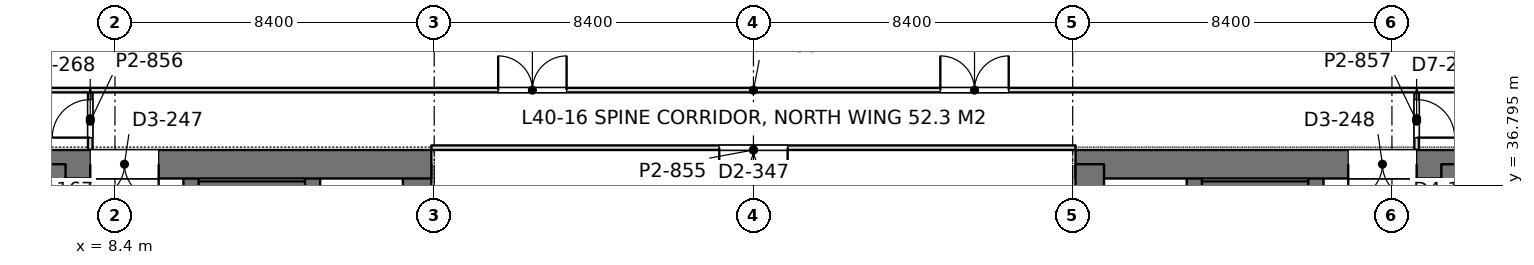
"""IFC4 building model, lengths in metres.
Left out: names, types, materials, properties, quantities, classifications, styles, units other than length and angle.
Written with IfcOpenShell. Run it as: python <this file> out.ifc"""

import sys

from ifc_helpers import new_model, si_unit, direction, frame, frame_2d, origin, place, context, subcontext, project, spatial, rectangle, extrude, element, fill, save


model = new_model("IFC4")
c1 = context("Model", 3, precision=1e-05, world=origin(), true_north=direction((0.0, 1.0)))
c2 = subcontext(c1, "Body", "Model", "MODEL_VIEW")
j1 = project(units=[si_unit("LENGTHUNIT", "METRE"), si_unit("PLANEANGLEUNIT", "RADIAN")], contexts=[c1])
p1 = place(None, origin())
s1 = spatial("IfcSite", under=j1, at=p1, CompositionType="ELEMENT")
p2 = place(p1, origin())
s2 = spatial("IfcBuilding", under=s1, at=p2, CompositionType="ELEMENT")
p3 = place(p2, frame((0.0, 0.0, 177.6)))
s3 = spatial("IfcBuildingStorey", under=s2, at=p3, CompositionType="ELEMENT", Elevation=177.6)
p4 = place(p3, frame((-1.125, 37.35, 0.0), z_axis=(0.0, 0.0, 1.0), x_axis=(1.0, 0.0, 0.0)))
e1 = element("IfcWall", 1, at=p4, inside=s3, PredefinedType="SHEAR", context=c2, shape_type="SweptSolid", body=[
    extrude(rectangle(XDim=17.85, YDim=0.75, at=frame_2d((8.925, 0.0))), origin(), (0.0, 0.0, 1.0), 4.2),
])
p5 = place(p4, frame((8.875, 0.0, 0.0)))
e2 = element("IfcOpeningElement", 2, at=p5, cuts=e1, PredefinedType="OPENING", context=c2, shape_type="SweptSolid", body=[
    extrude(rectangle(XDim=1.8, YDim=2.4, at=frame_2d((0.9, 1.2))), frame((0.0, 0.385, 0.0), z_axis=(0.0, -1.0, 0.0), x_axis=(1.0, 0.0, 0.0)), (0.0, 0.0, 1.0), 0.77),
])
p6 = place(p3, frame((16.35, 27.8, 0.0), z_axis=(0.0, 0.0, 1.0), x_axis=(0.0, 1.0, 0.0)))
e3 = element("IfcWall", 3, at=p6, inside=s3, PredefinedType="SHEAR", context=c2, shape_type="SweptSolid", body=[
    extrude(rectangle(XDim=9.55, YDim=0.75, at=frame_2d((4.775, 0.0))), origin(), (0.0, 0.0, 1.0), 4.2),
])
p7 = place(p3, frame((6.9, 13.05, 0.0), z_axis=(0.0, 0.0, 1.0), x_axis=(0.0, 1.0, 0.0)))
e4 = element("IfcWall", 4, at=p7, inside=s3, PredefinedType="SHEAR", context=c2, shape_type="SweptSolid", body=[
    extrude(rectangle(XDim=24.3, YDim=0.4, at=frame_2d((12.15, 0.0))), origin(), (0.0, 0.0, 1.0), 4.2),
])
p8 = place(p7, frame((1.3, 0.0, 0.0)))
e5 = element("IfcOpeningElement", 5, at=p8, cuts=e4, PredefinedType="OPENING", context=c2, shape_type="SweptSolid", body=[
    extrude(rectangle(XDim=1.0, YDim=2.2, at=frame_2d((0.5, 1.1))), frame((0.0, 0.21, 0.0), z_axis=(0.0, -1.0, 0.0), x_axis=(1.0, 0.0, 0.0)), (0.0, 0.0, 1.0), 0.42),
])
p9 = place(p7, frame((22.0, 0.0, 0.0)))
e6 = element("IfcOpeningElement", 6, at=p9, cuts=e4, PredefinedType="OPENING", context=c2, shape_type="SweptSolid", body=[
    extrude(rectangle(XDim=1.0, YDim=2.2, at=frame_2d((0.5, 1.1))), frame((0.0, 0.21, 0.0), z_axis=(0.0, -1.0, 0.0), x_axis=(1.0, 0.0, 0.0)), (0.0, 0.0, 1.0), 0.42),
])
p10 = place(p7, frame((5.55, 0.0, 0.0)))
e7 = element("IfcOpeningElement", 7, at=p10, cuts=e4, PredefinedType="OPENING", context=c2, shape_type="SweptSolid", body=[
    extrude(rectangle(XDim=1.0, YDim=2.2, at=frame_2d((0.5, 1.1))), frame((0.0, 0.21, 0.0), z_axis=(0.0, -1.0, 0.0), x_axis=(1.0, 0.0, 0.0)), (0.0, 0.0, 1.0), 0.42),
])
p11 = place(p7, frame((9.55, 0.0, 0.0)))
e8 = element("IfcOpeningElement", 8, at=p11, cuts=e4, PredefinedType="OPENING", context=c2, shape_type="SweptSolid", body=[
    extrude(rectangle(XDim=1.0, YDim=2.2, at=frame_2d((0.5, 1.1))), frame((0.0, 0.21, 0.0), z_axis=(0.0, -1.0, 0.0), x_axis=(1.0, 0.0, 0.0)), (0.0, 0.0, 1.0), 0.42),
])
p12 = place(p7, frame((12.8, 0.0, 0.0)))
e9 = element("IfcOpeningElement", 9, at=p12, cuts=e4, PredefinedType="OPENING", context=c2, shape_type="SweptSolid", body=[
    extrude(rectangle(XDim=1.1, YDim=2.2, at=frame_2d((0.55, 1.1))), frame((0.0, 0.21, 0.0), z_axis=(0.0, -1.0, 0.0), x_axis=(1.0, 0.0, 0.0)), (0.0, 0.0, 1.0), 0.42),
])
p13 = place(p7, frame((15.538, 0.0, 0.0)))
e10 = element("IfcOpeningElement", 10, at=p13, cuts=e4, PredefinedType="OPENING", context=c2, shape_type="SweptSolid", body=[
    extrude(rectangle(XDim=1.1, YDim=2.2, at=frame_2d((0.55, 1.1))), frame((0.0, 0.21, 0.0), z_axis=(0.0, -1.0, 0.0), x_axis=(1.0, 0.0, 0.0)), (0.0, 0.0, 1.0), 0.42),
])
p14 = place(p7, frame((18.262, 0.0, 0.0)))
e11 = element("IfcOpeningElement", 11, at=p14, cuts=e4, PredefinedType="OPENING", context=c2, shape_type="SweptSolid", body=[
    extrude(rectangle(XDim=1.1, YDim=2.2, at=frame_2d((0.55, 1.1))), frame((0.0, 0.21, 0.0), z_axis=(0.0, -1.0, 0.0), x_axis=(1.0, 0.0, 0.0)), (0.0, 0.0, 1.0), 0.42),
])
p15 = place(p3, frame((10.4, 13.05, 0.0), z_axis=(0.0, 0.0, 1.0), x_axis=(0.0, 1.0, 0.0)))
e12 = element("IfcWall", 12, at=p15, inside=s3, PredefinedType="SHEAR", context=c2, shape_type="SweptSolid", body=[
    extrude(rectangle(XDim=24.3, YDim=0.4, at=frame_2d((12.15, 0.0))), origin(), (0.0, 0.0, 1.0), 4.2),
])
p16 = place(p15, frame((15.75, 0.0, 0.0)))
e13 = element("IfcOpeningElement", 13, at=p16, cuts=e12, PredefinedType="OPENING", context=c2, shape_type="SweptSolid", body=[
    extrude(rectangle(XDim=1.1, YDim=2.2, at=frame_2d((0.55, 1.1))), frame((0.0, 0.21, 0.0), z_axis=(0.0, -1.0, 0.0), x_axis=(1.0, 0.0, 0.0)), (0.0, 0.0, 1.0), 0.42),
])
p17 = place(p15, frame((18.6, 0.0, 0.0)))
e14 = element("IfcOpeningElement", 14, at=p17, cuts=e12, PredefinedType="OPENING", context=c2, shape_type="SweptSolid", body=[
    extrude(rectangle(XDim=1.1, YDim=2.2, at=frame_2d((0.55, 1.1))), frame((0.0, 0.21, 0.0), z_axis=(0.0, -1.0, 0.0), x_axis=(1.0, 0.0, 0.0)), (0.0, 0.0, 1.0), 0.42),
])
p18 = place(p15, frame((21.45, 0.0, 0.0)))
e15 = element("IfcOpeningElement", 15, at=p18, cuts=e12, PredefinedType="OPENING", context=c2, shape_type="SweptSolid", body=[
    extrude(rectangle(XDim=1.1, YDim=2.2, at=frame_2d((0.55, 1.1))), frame((0.0, 0.21, 0.0), z_axis=(0.0, -1.0, 0.0), x_axis=(1.0, 0.0, 0.0)), (0.0, 0.0, 1.0), 0.42),
])
p19 = place(p15, frame((8.65, 0.0, 0.0)))
e16 = element("IfcOpeningElement", 16, at=p19, cuts=e12, PredefinedType="OPENING", context=c2, shape_type="SweptSolid", body=[
    extrude(rectangle(XDim=1.8, YDim=2.4, at=frame_2d((0.9, 1.2))), frame((0.0, 0.21, 0.0), z_axis=(0.0, -1.0, 0.0), x_axis=(1.0, 0.0, 0.0)), (0.0, 0.0, 1.0), 0.42),
])
p20 = place(p3, frame((13.6, 27.925, 0.0), z_axis=(0.0, 0.0, 1.0), x_axis=(0.0, 1.0, 0.0)))
e17 = element("IfcWall", 17, at=p20, inside=s3, PredefinedType="SHEAR", context=c2, shape_type="SweptSolid", body=[
    extrude(rectangle(XDim=9.425, YDim=0.4, at=frame_2d((4.712, 0.0))), origin(), (0.0, 0.0, 1.0), 4.2),
])
p21 = place(p3, frame((10.4, 36.625, 0.0), z_axis=(0.0, 0.0, 1.0), x_axis=(1.0, 0.0, 0.0)))
e18 = element("IfcWall", 18, at=p21, inside=s3, PredefinedType="SHEAR", context=c2, shape_type="SweptSolid", body=[
    extrude(rectangle(XDim=3.2, YDim=0.55, at=frame_2d((1.6, 0.0))), origin(), (0.0, 0.0, 1.0), 4.2),
])
p22 = place(p3, frame((33.675, 37.35, 0.0), z_axis=(0.0, 0.0, 1.0), x_axis=(1.0, 0.0, 0.0)))
e19 = element("IfcWall", 19, at=p22, inside=s3, PredefinedType="SHEAR", context=c2, shape_type="SweptSolid", body=[
    extrude(rectangle(XDim=17.85, YDim=0.75, at=frame_2d((8.925, 0.0))), origin(), (0.0, 0.0, 1.0), 4.2),
])
p23 = place(p22, frame((7.175, 0.0, 0.0)))
e20 = element("IfcOpeningElement", 20, at=p23, cuts=e19, PredefinedType="OPENING", context=c2, shape_type="SweptSolid", body=[
    extrude(rectangle(XDim=1.8, YDim=2.4, at=frame_2d((0.9, 1.2))), frame((0.0, 0.385, 0.0), z_axis=(0.0, -1.0, 0.0), x_axis=(1.0, 0.0, 0.0)), (0.0, 0.0, 1.0), 0.77),
])
p24 = place(p3, frame((34.05, 27.8, 0.0), z_axis=(0.0, 0.0, 1.0), x_axis=(0.0, 1.0, 0.0)))
e21 = element("IfcWall", 21, at=p24, inside=s3, PredefinedType="SHEAR", context=c2, shape_type="SweptSolid", body=[
    extrude(rectangle(XDim=9.55, YDim=0.75, at=frame_2d((4.775, 0.0))), origin(), (0.0, 0.0, 1.0), 4.2),
])
p25 = place(p3, frame((43.5, 13.05, 0.0), z_axis=(0.0, 0.0, 1.0), x_axis=(0.0, 1.0, 0.0)))
e22 = element("IfcWall", 22, at=p25, inside=s3, PredefinedType="SHEAR", context=c2, shape_type="SweptSolid", body=[
    extrude(rectangle(XDim=24.3, YDim=0.4, at=frame_2d((12.15, 0.0))), origin(), (0.0, 0.0, 1.0), 4.2),
])
p26 = place(p25, frame((1.3, 0.0, 0.0)))
e23 = element("IfcOpeningElement", 23, at=p26, cuts=e22, PredefinedType="OPENING", context=c2, shape_type="SweptSolid", body=[
    extrude(rectangle(XDim=1.0, YDim=2.2, at=frame_2d((0.5, 1.1))), frame((0.0, 0.21, 0.0), z_axis=(0.0, -1.0, 0.0), x_axis=(1.0, 0.0, 0.0)), (0.0, 0.0, 1.0), 0.42),
])
p27 = place(p25, frame((22.0, 0.0, 0.0)))
e24 = element("IfcOpeningElement", 24, at=p27, cuts=e22, PredefinedType="OPENING", context=c2, shape_type="SweptSolid", body=[
    extrude(rectangle(XDim=1.0, YDim=2.2, at=frame_2d((0.5, 1.1))), frame((0.0, 0.21, 0.0), z_axis=(0.0, -1.0, 0.0), x_axis=(1.0, 0.0, 0.0)), (0.0, 0.0, 1.0), 0.42),
])
p28 = place(p25, frame((5.55, 0.0, 0.0)))
e25 = element("IfcOpeningElement", 25, at=p28, cuts=e22, PredefinedType="OPENING", context=c2, shape_type="SweptSolid", body=[
    extrude(rectangle(XDim=1.0, YDim=2.2, at=frame_2d((0.5, 1.1))), frame((0.0, 0.21, 0.0), z_axis=(0.0, -1.0, 0.0), x_axis=(1.0, 0.0, 0.0)), (0.0, 0.0, 1.0), 0.42),
])
p29 = place(p25, frame((9.55, 0.0, 0.0)))
e26 = element("IfcOpeningElement", 26, at=p29, cuts=e22, PredefinedType="OPENING", context=c2, shape_type="SweptSolid", body=[
    extrude(rectangle(XDim=1.0, YDim=2.2, at=frame_2d((0.5, 1.1))), frame((0.0, 0.21, 0.0), z_axis=(0.0, -1.0, 0.0), x_axis=(1.0, 0.0, 0.0)), (0.0, 0.0, 1.0), 0.42),
])
p30 = place(p25, frame((12.8, 0.0, 0.0)))
e27 = element("IfcOpeningElement", 27, at=p30, cuts=e22, PredefinedType="OPENING", context=c2, shape_type="SweptSolid", body=[
    extrude(rectangle(XDim=1.1, YDim=2.2, at=frame_2d((0.55, 1.1))), frame((0.0, 0.21, 0.0), z_axis=(0.0, -1.0, 0.0), x_axis=(1.0, 0.0, 0.0)), (0.0, 0.0, 1.0), 0.42),
])
p31 = place(p25, frame((15.538, 0.0, 0.0)))
e28 = element("IfcOpeningElement", 28, at=p31, cuts=e22, PredefinedType="OPENING", context=c2, shape_type="SweptSolid", body=[
    extrude(rectangle(XDim=1.1, YDim=2.2, at=frame_2d((0.55, 1.1))), frame((0.0, 0.21, 0.0), z_axis=(0.0, -1.0, 0.0), x_axis=(1.0, 0.0, 0.0)), (0.0, 0.0, 1.0), 0.42),
])
p32 = place(p25, frame((18.262, 0.0, 0.0)))
e29 = element("IfcOpeningElement", 29, at=p32, cuts=e22, PredefinedType="OPENING", context=c2, shape_type="SweptSolid", body=[
    extrude(rectangle(XDim=1.1, YDim=2.2, at=frame_2d((0.55, 1.1))), frame((0.0, 0.21, 0.0), z_axis=(0.0, -1.0, 0.0), x_axis=(1.0, 0.0, 0.0)), (0.0, 0.0, 1.0), 0.42),
])
p33 = place(p3, frame((40.0, 13.05, 0.0), z_axis=(0.0, 0.0, 1.0), x_axis=(0.0, 1.0, 0.0)))
e30 = element("IfcWall", 30, at=p33, inside=s3, PredefinedType="SHEAR", context=c2, shape_type="SweptSolid", body=[
    extrude(rectangle(XDim=24.3, YDim=0.4, at=frame_2d((12.15, 0.0))), origin(), (0.0, 0.0, 1.0), 4.2),
])
p34 = place(p33, frame((15.75, 0.0, 0.0)))
e31 = element("IfcOpeningElement", 31, at=p34, cuts=e30, PredefinedType="OPENING", context=c2, shape_type="SweptSolid", body=[
    extrude(rectangle(XDim=1.1, YDim=2.2, at=frame_2d((0.55, 1.1))), frame((0.0, 0.21, 0.0), z_axis=(0.0, -1.0, 0.0), x_axis=(1.0, 0.0, 0.0)), (0.0, 0.0, 1.0), 0.42),
])
p35 = place(p33, frame((18.6, 0.0, 0.0)))
e32 = element("IfcOpeningElement", 32, at=p35, cuts=e30, PredefinedType="OPENING", context=c2, shape_type="SweptSolid", body=[
    extrude(rectangle(XDim=1.1, YDim=2.2, at=frame_2d((0.55, 1.1))), frame((0.0, 0.21, 0.0), z_axis=(0.0, -1.0, 0.0), x_axis=(1.0, 0.0, 0.0)), (0.0, 0.0, 1.0), 0.42),
])
p36 = place(p33, frame((21.45, 0.0, 0.0)))
e33 = element("IfcOpeningElement", 33, at=p36, cuts=e30, PredefinedType="OPENING", context=c2, shape_type="SweptSolid", body=[
    extrude(rectangle(XDim=1.1, YDim=2.2, at=frame_2d((0.55, 1.1))), frame((0.0, 0.21, 0.0), z_axis=(0.0, -1.0, 0.0), x_axis=(1.0, 0.0, 0.0)), (0.0, 0.0, 1.0), 0.42),
])
p37 = place(p33, frame((8.65, 0.0, 0.0)))
e34 = element("IfcOpeningElement", 34, at=p37, cuts=e30, PredefinedType="OPENING", context=c2, shape_type="SweptSolid", body=[
    extrude(rectangle(XDim=1.8, YDim=2.4, at=frame_2d((0.9, 1.2))), frame((0.0, 0.21, 0.0), z_axis=(0.0, -1.0, 0.0), x_axis=(1.0, 0.0, 0.0)), (0.0, 0.0, 1.0), 0.42),
])
p38 = place(p3, frame((36.8, 27.925, 0.0), z_axis=(0.0, 0.0, 1.0), x_axis=(0.0, 1.0, 0.0)))
e35 = element("IfcWall", 35, at=p38, inside=s3, PredefinedType="SHEAR", context=c2, shape_type="SweptSolid", body=[
    extrude(rectangle(XDim=9.425, YDim=0.4, at=frame_2d((4.712, 0.0))), origin(), (0.0, 0.0, 1.0), 4.2),
])
p39 = place(p3, frame((40.0, 36.625, 0.0), z_axis=(0.0, 0.0, 1.0), x_axis=(-1.0, 0.0, 0.0)))
e36 = element("IfcWall", 36, at=p39, inside=s3, PredefinedType="SHEAR", context=c2, shape_type="SweptSolid", body=[
    extrude(rectangle(XDim=3.2, YDim=0.55, at=frame_2d((1.6, 0.0))), origin(), (0.0, 0.0, 1.0), 4.2),
])
p40 = place(p3, frame((7.748, 39.3, 0.0), z_axis=(0.0, 0.0, 1.0), x_axis=(1.0, 0.0, 0.0)))
e37 = element("IfcWall", 37, at=p40, inside=s3, PredefinedType="PARTITIONING", context=c2, shape_type="SweptSolid", body=[
    extrude(rectangle(XDim=34.904, YDim=0.12, at=frame_2d((17.452, 0.0))), origin(), (0.0, 0.0, 1.0), 3.55),
])
p41 = place(p40, frame((10.735, 0.0, 0.0)))
e38 = element("IfcOpeningElement", 38, at=p41, cuts=e37, PredefinedType="OPENING", context=c2, shape_type="SweptSolid", body=[
    extrude(rectangle(XDim=1.8, YDim=2.2, at=frame_2d((0.9, 1.1))), frame((0.0, 0.07, 0.0), z_axis=(0.0, -1.0, 0.0), x_axis=(1.0, 0.0, 0.0)), (0.0, 0.0, 1.0), 0.14),
])
p42 = place(p40, frame((22.369, 0.0, 0.0)))
e39 = element("IfcOpeningElement", 39, at=p42, cuts=e37, PredefinedType="OPENING", context=c2, shape_type="SweptSolid", body=[
    extrude(rectangle(XDim=1.8, YDim=2.2, at=frame_2d((0.9, 1.1))), frame((0.0, 0.07, 0.0), z_axis=(0.0, -1.0, 0.0), x_axis=(1.0, 0.0, 0.0)), (0.0, 0.0, 1.0), 0.14),
])
p43 = place(p3, frame((7.75, 37.724, 0.0), z_axis=(0.0, 0.0, 1.0), x_axis=(0.0, 1.0, 0.0)))
e40 = element("IfcWall", 40, at=p43, inside=s3, PredefinedType="PARTITIONING", context=c2, shape_type="SweptSolid", body=[
    extrude(rectangle(XDim=1.518, YDim=0.12, at=frame_2d((0.759, 0.0))), origin(), (0.0, 0.0, 1.0), 4.05),
])
p44 = place(p43, frame((0.326, 0.0, 0.0)))
e41 = element("IfcOpeningElement", 41, at=p44, cuts=e40, PredefinedType="OPENING", context=c2, shape_type="SweptSolid", body=[
    extrude(rectangle(XDim=1.0, YDim=2.4, at=frame_2d((0.5, 1.2))), frame((0.0, 0.07, 0.0), z_axis=(0.0, -1.0, 0.0), x_axis=(1.0, 0.0, 0.0)), (0.0, 0.0, 1.0), 0.14),
])
p45 = place(p3, frame((42.65, 37.724, 0.0), z_axis=(0.0, 0.0, 1.0), x_axis=(0.0, 1.0, 0.0)))
e42 = element("IfcWall", 42, at=p45, inside=s3, PredefinedType="PARTITIONING", context=c2, shape_type="SweptSolid", body=[
    extrude(rectangle(XDim=1.518, YDim=0.12, at=frame_2d((0.759, 0.0))), origin(), (0.0, 0.0, 1.0), 4.05),
])
p46 = place(p45, frame((0.326, 0.0, 0.0)))
e43 = element("IfcOpeningElement", 43, at=p46, cuts=e42, PredefinedType="OPENING", context=c2, shape_type="SweptSolid", body=[
    extrude(rectangle(XDim=1.0, YDim=2.4, at=frame_2d((0.5, 1.2))), frame((0.0, 0.07, 0.0), z_axis=(0.0, -1.0, 0.0), x_axis=(1.0, 0.0, 0.0)), (0.0, 0.0, 1.0), 0.14),
])
for number, where, z_axis, x_axis in (
    (44, (1.2, 39.3, 0.0), (0.0, 0.0, 1.0), (1.0, 0.0, 0.0)),
    (45, (42.648, 39.3, 0.0), (0.0, 0.0, 1.0), (1.0, 0.0, 0.0)),
):
    element("IfcWall", number, at=place(p3, frame(where, z_axis=z_axis, x_axis=x_axis)), inside=s3, PredefinedType="PARTITIONING", context=c2, shape_type="SweptSolid", body=[
        extrude(rectangle(XDim=6.552, YDim=0.12, at=frame_2d((3.276, 0.0))), origin(), (0.0, 0.0, 1.0), 3.69),
    ])
p47 = place(p3, frame((16.725, 37.785, 0.0), z_axis=(0.0, 0.0, 1.0), x_axis=(1.0, 0.0, 0.0)))
e46 = element("IfcWall", 46, at=p47, inside=s3, PredefinedType="PARTITIONING", context=c2, shape_type="SweptSolid", body=[
    extrude(rectangle(XDim=16.95, YDim=0.12, at=frame_2d((8.475, 0.0))), origin(), (0.0, 0.0, 1.0), 3.55),
])
p48 = place(p47, frame((7.575, 0.0, 0.0)))
e47 = element("IfcOpeningElement", 47, at=p48, cuts=e46, PredefinedType="OPENING", context=c2, shape_type="SweptSolid", body=[
    extrude(rectangle(XDim=1.8, YDim=2.2, at=frame_2d((0.9, 1.1))), frame((0.0, 0.07, 0.0), z_axis=(0.0, -1.0, 0.0), x_axis=(1.0, 0.0, 0.0)), (0.0, 0.0, 1.0), 0.14),
])
p49 = place(p5, frame((1.8, 0.0, 0.0), z_axis=(0.0, 0.0, 1.0), x_axis=(-1.0, 0.0, 0.0)))
e48 = element("IfcDoor", 48, at=p49, inside=s3, OperationType="DOUBLE_DOOR_SINGLE_SWING", PredefinedType="DOOR", context=c2, shape_type="SweptSolid", body=[
    extrude(rectangle(XDim=1.8, YDim=2.4, at=frame_2d((0.9, 1.2))), frame((0.0, 0.025, 0.0), z_axis=(0.0, -1.0, 0.0), x_axis=(1.0, 0.0, 0.0)), (0.0, 0.0, 1.0), 0.05),
])
fill(e2, e48)
p50 = place(p23, frame((1.8, 0.0, 0.0), z_axis=(0.0, 0.0, 1.0), x_axis=(-1.0, 0.0, 0.0)))
e49 = element("IfcDoor", 49, at=p50, inside=s3, OperationType="DOUBLE_DOOR_SINGLE_SWING", PredefinedType="DOOR", context=c2, shape_type="SweptSolid", body=[
    extrude(rectangle(XDim=1.8, YDim=2.4, at=frame_2d((0.9, 1.2))), frame((0.0, 0.025, 0.0), z_axis=(0.0, -1.0, 0.0), x_axis=(1.0, 0.0, 0.0)), (0.0, 0.0, 1.0), 0.05),
])
fill(e20, e49)
p51 = place(p41, origin())
e50 = element("IfcDoor", 50, at=p51, inside=s3, OperationType="DOUBLE_DOOR_SINGLE_SWING", PredefinedType="DOOR", context=c2, shape_type="SweptSolid", body=[
    extrude(rectangle(XDim=1.8, YDim=2.2, at=frame_2d((0.9, 1.1))), frame((0.0, 0.025, 0.0), z_axis=(0.0, -1.0, 0.0), x_axis=(1.0, 0.0, 0.0)), (0.0, 0.0, 1.0), 0.05),
])
fill(e38, e50)
p52 = place(p42, origin())
e51 = element("IfcDoor", 51, at=p52, inside=s3, OperationType="DOUBLE_DOOR_SINGLE_SWING", PredefinedType="DOOR", context=c2, shape_type="SweptSolid", body=[
    extrude(rectangle(XDim=1.8, YDim=2.2, at=frame_2d((0.9, 1.1))), frame((0.0, 0.025, 0.0), z_axis=(0.0, -1.0, 0.0), x_axis=(1.0, 0.0, 0.0)), (0.0, 0.0, 1.0), 0.05),
])
fill(e39, e51)
p53 = place(p44, origin())
e52 = element("IfcDoor", 52, at=p53, inside=s3, OperationType="SINGLE_SWING_LEFT", PredefinedType="DOOR", context=c2, shape_type="SweptSolid", body=[
    extrude(rectangle(XDim=1.0, YDim=2.4, at=frame_2d((0.5, 1.2))), frame((0.0, 0.025, 0.0), z_axis=(0.0, -1.0, 0.0), x_axis=(1.0, 0.0, 0.0)), (0.0, 0.0, 1.0), 0.05),
])
fill(e41, e52)
p54 = place(p46, frame((1.0, 0.0, 0.0), z_axis=(0.0, 0.0, 1.0), x_axis=(-1.0, 0.0, 0.0)))
e53 = element("IfcDoor", 53, at=p54, inside=s3, OperationType="SINGLE_SWING_RIGHT", PredefinedType="DOOR", context=c2, shape_type="SweptSolid", body=[
    extrude(rectangle(XDim=1.0, YDim=2.4, at=frame_2d((0.5, 1.2))), frame((0.0, 0.025, 0.0), z_axis=(0.0, -1.0, 0.0), x_axis=(1.0, 0.0, 0.0)), (0.0, 0.0, 1.0), 0.05),
])
fill(e43, e53)
p55 = place(p48, frame((1.8, 0.0, 0.0), z_axis=(0.0, 0.0, 1.0), x_axis=(-1.0, 0.0, 0.0)))
e54 = element("IfcDoor", 54, at=p55, inside=s3, OperationType="DOUBLE_DOOR_SINGLE_SWING", PredefinedType="DOOR", context=c2, shape_type="SweptSolid", body=[
    extrude(rectangle(XDim=1.8, YDim=2.2, at=frame_2d((0.9, 1.1))), frame((0.0, 0.025, 0.0), z_axis=(0.0, -1.0, 0.0), x_axis=(1.0, 0.0, 0.0)), (0.0, 0.0, 1.0), 0.05),
])
fill(e47, e54)
save(model, sys.argv[1])
